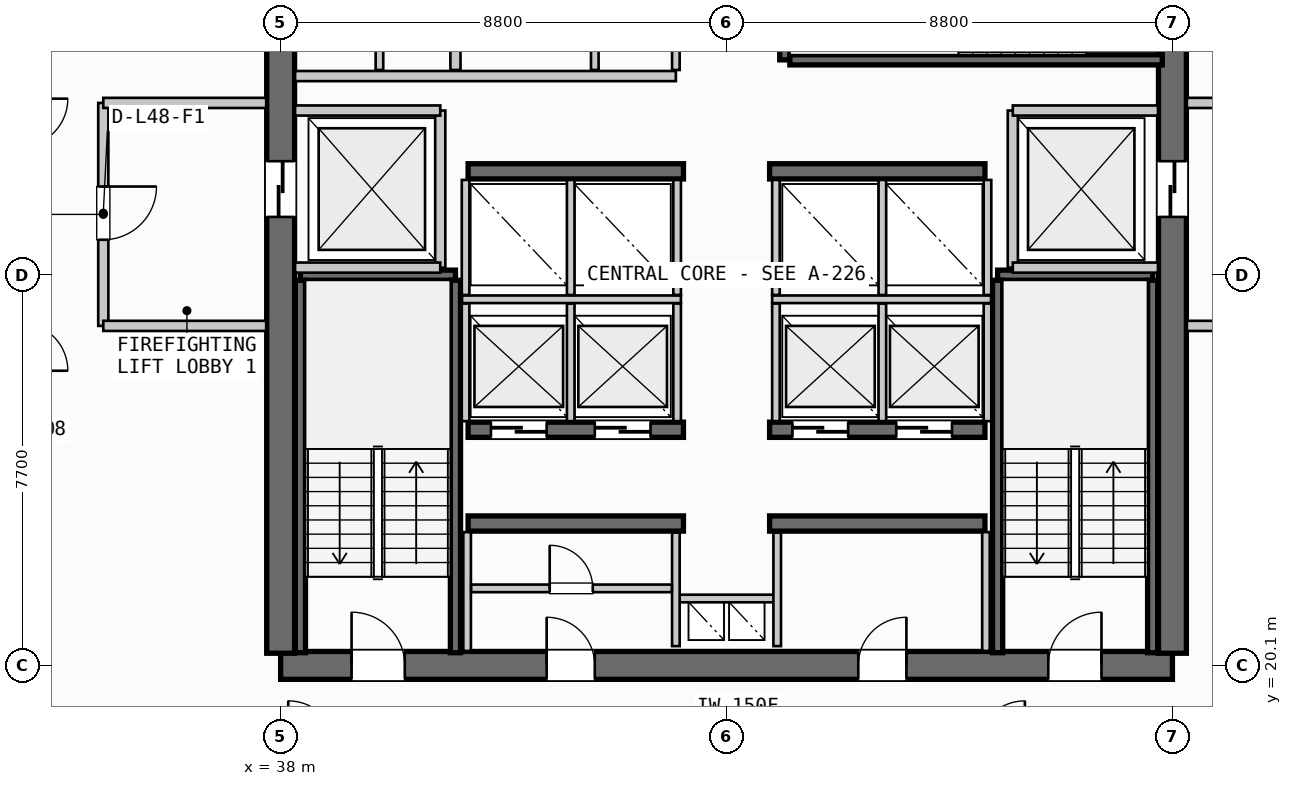
"""IFC4 building model, lengths in metres.
Left out: names, types, materials, properties, quantities, classifications, styles, units other than length and angle.
Written with IfcOpenShell. Run it as: python <this file> out.ifc"""

import sys

from ifc_helpers import new_model, si_unit, direction, frame, frame_2d, origin, place, context, subcontext, project, spatial, rectangle, extrude, source, transform, mapped, element, fill, save


model = new_model("IFC4")
c1 = context("Model", 3, precision=1e-05, world=origin(), true_north=direction((0.0, 1.0)))
c2 = subcontext(c1, "Body", "Model", "MODEL_VIEW")
j1 = project(units=[si_unit("LENGTHUNIT", "METRE"), si_unit("PLANEANGLEUNIT", "RADIAN")], contexts=[c1])
p1 = place(None, origin())
s1 = spatial("IfcSite", under=j1, at=p1, CompositionType="ELEMENT")
p2 = place(p1, origin())
s2 = spatial("IfcBuilding", under=s1, at=p2, CompositionType="ELEMENT")
p3 = place(p2, frame((0.0, 0.0, 186.9)))
s3 = spatial("IfcBuildingStorey", under=s2, at=p3, CompositionType="ELEMENT", Elevation=186.9)
p4 = place(p3, frame((38.0, 20.1, 0.0), z_axis=(0.0, 0.0, 1.0), x_axis=(1.0, 0.0, 0.0)))
e1 = element("IfcWall", 1, at=p4, inside=s3, PredefinedType="SHEAR", context=c2, shape_type="SweptSolid", body=[
    extrude(rectangle(XDim=17.6, YDim=0.55, at=frame_2d((8.8, 0.0))), origin(), (0.0, 0.0, 1.0), 3.26),
])
p5 = place(p4, frame((1.4, 0.0, 0.0)))
e2 = element("IfcOpeningElement", 2, at=p5, cuts=e1, PredefinedType="OPENING", context=c2, shape_type="SweptSolid", body=[
    extrude(rectangle(XDim=1.05, YDim=2.15, at=frame_2d((0.525, 1.075))), frame((0.0, 0.285, 0.0), z_axis=(0.0, -1.0, 0.0), x_axis=(1.0, 0.0, 0.0)), (0.0, 0.0, 1.0), 0.57),
])
p6 = place(p4, frame((15.15, 0.0, 0.0)))
e3 = element("IfcOpeningElement", 3, at=p6, cuts=e1, PredefinedType="OPENING", context=c2, shape_type="SweptSolid", body=[
    extrude(rectangle(XDim=1.05, YDim=2.15, at=frame_2d((0.525, 1.075))), frame((0.0, 0.285, 0.0), z_axis=(0.0, -1.0, 0.0), x_axis=(1.0, 0.0, 0.0)), (0.0, 0.0, 1.0), 0.57),
])
p7 = place(p4, frame((5.25, 0.0, 0.0)))
e4 = element("IfcOpeningElement", 4, at=p7, cuts=e1, PredefinedType="OPENING", context=c2, shape_type="SweptSolid", body=[
    extrude(rectangle(XDim=0.95, YDim=2.15, at=frame_2d((0.475, 1.075))), frame((0.0, 0.285, 0.0), z_axis=(0.0, -1.0, 0.0), x_axis=(1.0, 0.0, 0.0)), (0.0, 0.0, 1.0), 0.57),
])
p8 = place(p4, frame((11.4, 0.0, 0.0)))
e5 = element("IfcOpeningElement", 5, at=p8, cuts=e1, PredefinedType="OPENING", context=c2, shape_type="SweptSolid", body=[
    extrude(rectangle(XDim=0.95, YDim=2.15, at=frame_2d((0.475, 1.075))), frame((0.0, 0.285, 0.0), z_axis=(0.0, -1.0, 0.0), x_axis=(1.0, 0.0, 0.0)), (0.0, 0.0, 1.0), 0.57),
])
p9 = place(p3, frame((38.0, 35.26, 0.0), z_axis=(0.0, 0.0, 1.0), x_axis=(0.0, -1.0, 0.0)))
e6 = element("IfcWall", 6, at=p9, inside=s3, PredefinedType="SHEAR", context=c2, shape_type="SweptSolid", body=[
    extrude(rectangle(XDim=14.92, YDim=0.55, at=frame_2d((7.46, 0.0))), origin(), (0.0, 0.0, 1.0), 3.26),
])
p10 = place(p9, frame((5.21, 0.0, 0.0)))
e7 = element("IfcOpeningElement", 7, at=p10, cuts=e6, PredefinedType="OPENING", context=c2, shape_type="SweptSolid", body=[
    extrude(rectangle(XDim=1.1, YDim=2.2, at=frame_2d((0.55, 1.1))), frame((0.0, 0.285, 0.0), z_axis=(0.0, -1.0, 0.0), x_axis=(1.0, 0.0, 0.0)), (0.0, 0.0, 1.0), 0.57),
])
p11 = place(p3, frame((55.6, 20.34, 0.0), z_axis=(0.0, 0.0, 1.0), x_axis=(0.0, 1.0, 0.0)))
e8 = element("IfcWall", 8, at=p11, inside=s3, PredefinedType="SHEAR", context=c2, shape_type="SweptSolid", body=[
    extrude(rectangle(XDim=14.92, YDim=0.55, at=frame_2d((7.46, 0.0))), origin(), (0.0, 0.0, 1.0), 3.26),
])
p12 = place(p11, frame((12.71, 0.0, 0.0)))
e9 = element("IfcOpeningElement", 9, at=p12, cuts=e8, PredefinedType="OPENING", context=c2, shape_type="SweptSolid", body=[
    extrude(rectangle(XDim=1.05, YDim=2.15, at=frame_2d((0.525, 1.075))), frame((0.0, 0.285, 0.0), z_axis=(0.0, -1.0, 0.0), x_axis=(1.0, 0.0, 0.0)), (0.0, 0.0, 1.0), 0.57),
])
p13 = place(p11, frame((8.61, 0.0, 0.0)))
e10 = element("IfcOpeningElement", 10, at=p13, cuts=e8, PredefinedType="OPENING", context=c2, shape_type="SweptSolid", body=[
    extrude(rectangle(XDim=1.1, YDim=2.2, at=frame_2d((0.55, 1.1))), frame((0.0, 0.285, 0.0), z_axis=(0.0, -1.0, 0.0), x_axis=(1.0, 0.0, 0.0)), (0.0, 0.0, 1.0), 0.57),
])
for number, where, z_axis, x_axis in (
    (11, (41.7, 22.9, 0.0), (0.0, 0.0, 1.0), (1.0, 0.0, 0.0)),
    (12, (47.65, 22.9, 0.0), (0.0, 0.0, 1.0), (1.0, 0.0, 0.0)),
):
    element("IfcWall", number, at=place(p3, frame(where, z_axis=z_axis, x_axis=x_axis)), inside=s3, PredefinedType="SHEAR", context=c2, shape_type="SweptSolid", body=[
        extrude(rectangle(XDim=4.25, YDim=0.3, at=frame_2d((2.125, 0.0))), origin(), (0.0, 0.0, 1.0), 3.26),
    ])
p14 = place(p3, frame((41.7, 24.75, 0.0), z_axis=(0.0, 0.0, 1.0), x_axis=(1.0, 0.0, 0.0)))
e13 = element("IfcWall", 13, at=p14, inside=s3, PredefinedType="SHEAR", context=c2, shape_type="SweptSolid", body=[
    extrude(rectangle(XDim=4.25, YDim=0.3, at=frame_2d((2.125, 0.0))), origin(), (0.0, 0.0, 1.0), 3.26),
])
p15 = place(p14, frame((0.45, 0.0, 0.0)))
e14 = element("IfcOpeningElement", 14, at=p15, cuts=e13, PredefinedType="OPENING", context=c2, shape_type="SweptSolid", body=[
    extrude(rectangle(XDim=1.1, YDim=2.2, at=frame_2d((0.55, 1.1))), frame((0.0, 0.16, 0.0), z_axis=(0.0, -1.0, 0.0), x_axis=(1.0, 0.0, 0.0)), (0.0, 0.0, 1.0), 0.32),
])
p16 = place(p14, frame((2.5, 0.0, 0.0)))
e15 = element("IfcOpeningElement", 15, at=p16, cuts=e13, PredefinedType="OPENING", context=c2, shape_type="SweptSolid", body=[
    extrude(rectangle(XDim=1.1, YDim=2.2, at=frame_2d((0.55, 1.1))), frame((0.0, 0.16, 0.0), z_axis=(0.0, -1.0, 0.0), x_axis=(1.0, 0.0, 0.0)), (0.0, 0.0, 1.0), 0.32),
])
p17 = place(p3, frame((47.65, 24.75, 0.0), z_axis=(0.0, 0.0, 1.0), x_axis=(1.0, 0.0, 0.0)))
e16 = element("IfcWall", 16, at=p17, inside=s3, PredefinedType="SHEAR", context=c2, shape_type="SweptSolid", body=[
    extrude(rectangle(XDim=4.25, YDim=0.3, at=frame_2d((2.125, 0.0))), origin(), (0.0, 0.0, 1.0), 3.26),
])
p18 = place(p17, frame((0.45, 0.0, 0.0)))
e17 = element("IfcOpeningElement", 17, at=p18, cuts=e16, PredefinedType="OPENING", context=c2, shape_type="SweptSolid", body=[
    extrude(rectangle(XDim=1.1, YDim=2.2, at=frame_2d((0.55, 1.1))), frame((0.0, 0.16, 0.0), z_axis=(0.0, -1.0, 0.0), x_axis=(1.0, 0.0, 0.0)), (0.0, 0.0, 1.0), 0.32),
])
p19 = place(p17, frame((2.5, 0.0, 0.0)))
e18 = element("IfcOpeningElement", 18, at=p19, cuts=e16, PredefinedType="OPENING", context=c2, shape_type="SweptSolid", body=[
    extrude(rectangle(XDim=1.1, YDim=2.2, at=frame_2d((0.55, 1.1))), frame((0.0, 0.16, 0.0), z_axis=(0.0, -1.0, 0.0), x_axis=(1.0, 0.0, 0.0)), (0.0, 0.0, 1.0), 0.32),
])
for number, where, z_axis, x_axis in (
    (19, (41.7, 29.85, 0.0), (0.0, 0.0, 1.0), (1.0, 0.0, 0.0)),
    (20, (47.65, 29.85, 0.0), (0.0, 0.0, 1.0), (1.0, 0.0, 0.0)),
):
    element("IfcWall", number, at=place(p3, frame(where, z_axis=z_axis, x_axis=x_axis)), inside=s3, PredefinedType="SHEAR", context=c2, shape_type="SweptSolid", body=[
        extrude(rectangle(XDim=4.25, YDim=0.3, at=frame_2d((2.125, 0.0))), origin(), (0.0, 0.0, 1.0), 3.26),
    ])
p20 = place(p3, frame((38.39, 27.8, 0.0), z_axis=(0.0, 0.0, 1.0), x_axis=(1.0, 0.0, 0.0)))
e21 = element("IfcWall", 21, at=p20, inside=s3, PredefinedType="SHEAR", context=c2, shape_type="SweptSolid", body=[
    extrude(rectangle(XDim=3.06, YDim=0.2, at=frame_2d((1.53, 0.0))), origin(), (0.0, 0.0, 1.0), 3.26),
])
for number, where, z_axis, x_axis in (
    (22, (41.45, 27.7, 0.0), (0.0, 0.0, 1.0), (0.0, -1.0, 0.0)),
    (23, (38.39, 20.35, 0.0), (0.0, 0.0, 1.0), (0.0, 1.0, 0.0)),
):
    element("IfcWall", number, at=place(p3, frame(where, z_axis=z_axis, x_axis=x_axis)), inside=s3, PredefinedType="SHEAR", context=c2, shape_type="SweptSolid", body=[
        extrude(rectangle(XDim=7.35, YDim=0.2, at=frame_2d((3.675, 0.0))), origin(), (0.0, 0.0, 1.0), 3.26),
    ])
p21 = place(p3, frame((52.15, 27.8, 0.0), z_axis=(0.0, 0.0, 1.0), x_axis=(1.0, 0.0, 0.0)))
e24 = element("IfcWall", 24, at=p21, inside=s3, PredefinedType="SHEAR", context=c2, shape_type="SweptSolid", body=[
    extrude(rectangle(XDim=3.06, YDim=0.2, at=frame_2d((1.53, 0.0))), origin(), (0.0, 0.0, 1.0), 3.26),
])
for number, where, z_axis, x_axis in (
    (25, (55.21, 27.7, 0.0), (0.0, 0.0, 1.0), (0.0, -1.0, 0.0)),
    (26, (52.15, 20.35, 0.0), (0.0, 0.0, 1.0), (0.0, 1.0, 0.0)),
):
    element("IfcWall", number, at=place(p3, frame(where, z_axis=z_axis, x_axis=x_axis)), inside=s3, PredefinedType="SHEAR", context=c2, shape_type="SweptSolid", body=[
        extrude(rectangle(XDim=7.35, YDim=0.2, at=frame_2d((3.675, 0.0))), origin(), (0.0, 0.0, 1.0), 3.26),
    ])
p22 = place(p3, frame((47.95, 32.05, 0.0), z_axis=(0.0, 0.0, 1.0), x_axis=(0.0, 1.0, 0.0)))
e27 = element("IfcWall", 27, at=p22, inside=s3, PredefinedType="SHEAR", context=c2, shape_type="SweptSolid", body=[
    extrude(rectangle(XDim=3.06, YDim=0.2, at=frame_2d((1.53, 0.0))), origin(), (0.0, 0.0, 1.0), 3.26),
])
p23 = place(p3, frame((55.4, 32.05, 0.0), z_axis=(0.0, 0.0, 1.0), x_axis=(-1.0, 0.0, 0.0)))
e28 = element("IfcWall", 28, at=p23, inside=s3, PredefinedType="SHEAR", context=c2, shape_type="SweptSolid", body=[
    extrude(rectangle(XDim=7.35, YDim=0.2, at=frame_2d((3.675, 0.0))), origin(), (0.0, 0.0, 1.0), 3.26),
])
p24 = place(p3, frame((45.8, 21.42, 0.0), z_axis=(0.0, 0.0, 1.0), x_axis=(1.0, 0.0, 0.0)))
e29 = element("IfcWall", 29, at=p24, inside=s3, PredefinedType="PARTITIONING", context=c2, shape_type="SweptSolid", body=[
    extrude(rectangle(XDim=2.0, YDim=0.15, at=frame_2d((1.0, 0.0))), origin(), (0.0, 0.0, 1.0), 2.735),
])
for number, where, z_axis, x_axis in (
    (30, (45.8, 20.48, 0.0), (0.0, 0.0, 1.0), (0.0, 1.0, 0.0)),
    (31, (47.8, 20.48, 0.0), (0.0, 0.0, 1.0), (0.0, 1.0, 0.0)),
):
    element("IfcWall", number, at=place(p3, frame(where, z_axis=z_axis, x_axis=x_axis)), inside=s3, PredefinedType="PARTITIONING", context=c2, shape_type="SweptSolid", body=[
        extrude(rectangle(XDim=2.24, YDim=0.15, at=frame_2d((1.12, 0.0))), origin(), (0.0, 0.0, 1.0), 2.735),
    ])
p25 = place(p3, frame((41.15, 27.95, 0.0), z_axis=(0.0, 0.0, 1.0), x_axis=(0.0, 1.0, 0.0)))
e32 = element("IfcWall", 32, at=p25, inside=s3, PredefinedType="PARTITIONING", context=c2, shape_type="SweptSolid", body=[
    extrude(rectangle(XDim=3.1, YDim=0.2, at=frame_2d((1.55, 0.0))), origin(), (0.0, 0.0, 1.0), 2.735),
])
for number, where, z_axis, x_axis in (
    (33, (38.285, 27.95, 0.0), (0.0, 0.0, 1.0), (1.0, 0.0, 0.0)),
    (34, (38.285, 31.05, 0.0), (0.0, 0.0, 1.0), (1.0, 0.0, 0.0)),
):
    element("IfcWall", number, at=place(p3, frame(where, z_axis=z_axis, x_axis=x_axis)), inside=s3, PredefinedType="PARTITIONING", context=c2, shape_type="SweptSolid", body=[
        extrude(rectangle(XDim=2.865, YDim=0.2, at=frame_2d((1.433, 0.0))), origin(), (0.0, 0.0, 1.0), 2.735),
    ])
p26 = place(p3, frame((34.5, 31.2, 0.0), z_axis=(0.0, 0.0, 1.0), x_axis=(0.0, -1.0, 0.0)))
e35 = element("IfcWall", 35, at=p26, inside=s3, PredefinedType="PARTITIONING", context=c2, shape_type="SweptSolid", body=[
    extrude(rectangle(XDim=4.4, YDim=0.2, at=frame_2d((2.2, 0.0))), origin(), (0.0, 0.0, 1.0), 2.735),
])
p27 = place(p26, frame((1.65, 0.0, 0.0)))
e36 = element("IfcOpeningElement", 36, at=p27, cuts=e35, PredefinedType="OPENING", context=c2, shape_type="SweptSolid", body=[
    extrude(rectangle(XDim=1.05, YDim=2.15, at=frame_2d((0.525, 1.075))), frame((0.0, 0.11, 0.0), z_axis=(0.0, -1.0, 0.0), x_axis=(1.0, 0.0, 0.0)), (0.0, 0.0, 1.0), 0.22),
])
for number, where, z_axis, x_axis in (
    (37, (34.5, 26.8, 0.0), (0.0, 0.0, 1.0), (1.0, 0.0, 0.0)),
    (38, (34.5, 31.2, 0.0), (0.0, 0.0, 1.0), (1.0, 0.0, 0.0)),
):
    element("IfcWall", number, at=place(p3, frame(where, z_axis=z_axis, x_axis=x_axis)), inside=s3, PredefinedType="PARTITIONING", context=c2, shape_type="SweptSolid", body=[
        extrude(rectangle(XDim=3.215, YDim=0.2, at=frame_2d((1.607, 0.0))), origin(), (0.0, 0.0, 1.0), 2.735),
    ])
p28 = place(p3, frame((52.45, 27.95, 0.0), z_axis=(0.0, 0.0, 1.0), x_axis=(0.0, 1.0, 0.0)))
e39 = element("IfcWall", 39, at=p28, inside=s3, PredefinedType="PARTITIONING", context=c2, shape_type="SweptSolid", body=[
    extrude(rectangle(XDim=3.1, YDim=0.2, at=frame_2d((1.55, 0.0))), origin(), (0.0, 0.0, 1.0), 2.735),
])
for number, where, z_axis, x_axis in (
    (40, (52.45, 27.95, 0.0), (0.0, 0.0, 1.0), (1.0, 0.0, 0.0)),
    (41, (52.45, 31.05, 0.0), (0.0, 0.0, 1.0), (1.0, 0.0, 0.0)),
):
    element("IfcWall", number, at=place(p3, frame(where, z_axis=z_axis, x_axis=x_axis)), inside=s3, PredefinedType="PARTITIONING", context=c2, shape_type="SweptSolid", body=[
        extrude(rectangle(XDim=2.865, YDim=0.2, at=frame_2d((1.433, 0.0))), origin(), (0.0, 0.0, 1.0), 2.735),
    ])
for number, where, z_axis, x_axis in (
    (42, (55.885, 26.8, 0.0), (0.0, 0.0, 1.0), (1.0, 0.0, 0.0)),
    (43, (55.885, 31.2, 0.0), (0.0, 0.0, 1.0), (1.0, 0.0, 0.0)),
):
    element("IfcWall", number, at=place(p3, frame(where, z_axis=z_axis, x_axis=x_axis)), inside=s3, PredefinedType="PARTITIONING", context=c2, shape_type="SweptSolid", body=[
        extrude(rectangle(XDim=3.215, YDim=0.2, at=frame_2d((1.607, 0.0))), origin(), (0.0, 0.0, 1.0), 2.735),
    ])
for number, where, z_axis, x_axis in (
    (44, (41.68, 20.385, 0.0), (0.0, 0.0, 1.0), (0.0, 1.0, 0.0)),
    (45, (51.92, 20.385, 0.0), (0.0, 0.0, 1.0), (0.0, 1.0, 0.0)),
):
    element("IfcWall", number, at=place(p3, frame(where, z_axis=z_axis, x_axis=x_axis)), inside=s3, PredefinedType="PARTITIONING", context=c2, shape_type="SweptSolid", body=[
        extrude(rectangle(XDim=2.345, YDim=0.15, at=frame_2d((1.172, 0.0))), origin(), (0.0, 0.0, 1.0), 2.735),
    ])
p29 = place(p3, frame((41.76, 21.62, 0.0), z_axis=(0.0, 0.0, 1.0), x_axis=(1.0, 0.0, 0.0)))
e46 = element("IfcWall", 46, at=p29, inside=s3, PredefinedType="PARTITIONING", context=c2, shape_type="SweptSolid", body=[
    extrude(rectangle(XDim=3.96, YDim=0.15, at=frame_2d((1.98, 0.0))), origin(), (0.0, 0.0, 1.0), 2.735),
])
p30 = place(p29, frame((1.55, 0.0, 0.0)))
e47 = element("IfcOpeningElement", 47, at=p30, cuts=e46, PredefinedType="OPENING", context=c2, shape_type="SweptSolid", body=[
    extrude(rectangle(XDim=0.85, YDim=2.15, at=frame_2d((0.425, 1.075))), frame((0.0, 0.085, 0.0), z_axis=(0.0, -1.0, 0.0), x_axis=(1.0, 0.0, 0.0)), (0.0, 0.0, 1.0), 0.17),
])
p31 = place(p3, frame((41.58, 27.325, 0.0), z_axis=(0.0, 0.0, 1.0), x_axis=(1.0, 0.0, 0.0)))
e48 = element("IfcWall", 48, at=p31, inside=s3, PredefinedType="PARTITIONING", context=c2, shape_type="SweptSolid", body=[
    extrude(rectangle(XDim=4.32, YDim=0.15, at=frame_2d((2.16, 0.0))), origin(), (0.0, 0.0, 1.0), 2.735),
])
p32 = place(p3, frame((47.7, 27.325, 0.0), z_axis=(0.0, 0.0, 1.0), x_axis=(1.0, 0.0, 0.0)))
e49 = element("IfcWall", 49, at=p32, inside=s3, PredefinedType="PARTITIONING", context=c2, shape_type="SweptSolid", body=[
    extrude(rectangle(XDim=4.32, YDim=0.15, at=frame_2d((2.16, 0.0))), origin(), (0.0, 0.0, 1.0), 2.735),
])
for number, where, z_axis, x_axis in (
    (50, (41.65, 24.92, 0.0), (0.0, 0.0, 1.0), (0.0, 1.0, 0.0)),
    (51, (43.725, 24.92, 0.0), (0.0, 0.0, 1.0), (0.0, 1.0, 0.0)),
    (52, (45.825, 24.92, 0.0), (0.0, 0.0, 1.0), (0.0, 1.0, 0.0)),
    (53, (47.775, 24.92, 0.0), (0.0, 0.0, 1.0), (0.0, 1.0, 0.0)),
    (54, (49.875, 24.92, 0.0), (0.0, 0.0, 1.0), (0.0, 1.0, 0.0)),
    (55, (51.95, 24.92, 0.0), (0.0, 0.0, 1.0), (0.0, 1.0, 0.0)),
):
    element("IfcWall", number, at=place(p3, frame(where, z_axis=z_axis, x_axis=x_axis)), inside=s3, PredefinedType="PARTITIONING", context=c2, shape_type="SweptSolid", body=[
        extrude(rectangle(XDim=2.32, YDim=0.15, at=frame_2d((1.16, 0.0))), origin(), (0.0, 0.0, 1.0), 2.735),
    ])
for number, where, z_axis, x_axis in (
    (56, (41.65, 27.41, 0.0), (0.0, 0.0, 1.0), (0.0, 1.0, 0.0)),
    (57, (43.725, 27.41, 0.0), (0.0, 0.0, 1.0), (0.0, 1.0, 0.0)),
    (58, (45.825, 27.41, 0.0), (0.0, 0.0, 1.0), (0.0, 1.0, 0.0)),
    (59, (47.775, 27.41, 0.0), (0.0, 0.0, 1.0), (0.0, 1.0, 0.0)),
    (60, (49.875, 27.41, 0.0), (0.0, 0.0, 1.0), (0.0, 1.0, 0.0)),
    (61, (51.95, 27.41, 0.0), (0.0, 0.0, 1.0), (0.0, 1.0, 0.0)),
):
    element("IfcWall", number, at=place(p3, frame(where, z_axis=z_axis, x_axis=x_axis)), inside=s3, PredefinedType="PARTITIONING", context=c2, shape_type="SweptSolid", body=[
        extrude(rectangle(XDim=2.27, YDim=0.15, at=frame_2d((1.135, 0.0))), origin(), (0.0, 0.0, 1.0), 2.735),
    ])
p33 = place(p3, frame((41.45, 31.85, 0.0), z_axis=(0.0, 0.0, 1.0), x_axis=(0.0, 1.0, 0.0)))
e62 = element("IfcWall", 62, at=p33, inside=s3, PredefinedType="PARTITIONING", context=c2, shape_type="SweptSolid", body=[
    extrude(rectangle(XDim=3.365, YDim=0.2, at=frame_2d((1.683, 0.0))), origin(), (0.0, 0.0, 1.0), 2.735),
])
p34 = place(p3, frame((38.285, 31.73, 0.0), z_axis=(0.0, 0.0, 1.0), x_axis=(1.0, 0.0, 0.0)))
e63 = element("IfcWall", 63, at=p34, inside=s3, PredefinedType="PARTITIONING", context=c2, shape_type="SweptSolid", body=[
    extrude(rectangle(XDim=7.515, YDim=0.2, at=frame_2d((3.758, 0.0))), origin(), (0.0, 0.0, 1.0), 2.735),
])
for number, where, z_axis, x_axis in (
    (64, (45.8, 31.85, 0.0), (0.0, 0.0, 1.0), (0.0, 1.0, 0.0)),
    (65, (39.95, 31.85, 0.0), (0.0, 0.0, 1.0), (0.0, 1.0, 0.0)),
):
    element("IfcWall", number, at=place(p3, frame(where, z_axis=z_axis, x_axis=x_axis)), inside=s3, PredefinedType="PARTITIONING", context=c2, shape_type="SweptSolid", body=[
        extrude(rectangle(XDim=3.365, YDim=0.15, at=frame_2d((1.683, 0.0))), origin(), (0.0, 0.0, 1.0), 2.735),
    ])
p35 = place(p3, frame((44.2, 31.85, 0.0), z_axis=(0.0, 0.0, 1.0), x_axis=(0.0, 1.0, 0.0)))
e66 = element("IfcWall", 66, at=p35, inside=s3, PredefinedType="PLUMBINGWALL", context=c2, shape_type="SweptSolid", body=[
    extrude(rectangle(XDim=3.365, YDim=0.15, at=frame_2d((1.683, 0.0))), origin(), (0.0, 0.0, 1.0), 2.735),
])
m1 = source(origin(), c2, "Body", "SweptSolid", [
    extrude(rectangle(XDim=1.05, YDim=2.15, at=frame_2d((0.525, 1.075))), frame((0.0, 0.025, 0.0), z_axis=(0.0, -1.0, 0.0), x_axis=(1.0, 0.0, 0.0)), (0.0, 0.0, 1.0), 0.05),
])
p36 = place(p5, origin())
e67 = element("IfcDoor", 67, at=p36, inside=s3, OperationType="SINGLE_SWING_LEFT", PredefinedType="DOOR", context=c2, shape_type="MappedRepresentation", body=[
    mapped(m1, transform((0.0, 0.0, 0.0), scale=1.0)),
])
fill(e2, e67)
p37 = place(p6, origin())
e68 = element("IfcDoor", 68, at=p37, inside=s3, OperationType="SINGLE_SWING_RIGHT", PredefinedType="DOOR", context=c2, shape_type="MappedRepresentation", body=[
    mapped(m1, transform((0.0, 0.0, 0.0), scale=1.0)),
])
fill(e3, e68)
m2 = source(origin(), c2, "Body", "SweptSolid", [
    extrude(rectangle(XDim=1.1, YDim=2.2, at=frame_2d((0.55, 1.1))), frame((0.0, 0.025, 0.0), z_axis=(0.0, -1.0, 0.0), x_axis=(1.0, 0.0, 0.0)), (0.0, 0.0, 1.0), 0.05),
])
p38 = place(p10, origin())
e69 = element("IfcDoor", 69, at=p38, inside=s3, OperationType="SLIDING_TO_LEFT", PredefinedType="DOOR", context=c2, shape_type="MappedRepresentation", body=[
    mapped(m2, transform((0.0, 0.0, 0.0), scale=1.0)),
])
fill(e7, e69)
p39 = place(p13, origin())
e70 = element("IfcDoor", 70, at=p39, inside=s3, OperationType="SLIDING_TO_RIGHT", PredefinedType="DOOR", context=c2, shape_type="MappedRepresentation", body=[
    mapped(m2, transform((0.0, 0.0, 0.0), scale=1.0)),
])
fill(e10, e70)
m3 = source(origin(), c2, "Body", "SweptSolid", [
    extrude(rectangle(XDim=0.95, YDim=2.15, at=frame_2d((0.475, 1.075))), frame((0.0, 0.025, 0.0), z_axis=(0.0, -1.0, 0.0), x_axis=(1.0, 0.0, 0.0)), (0.0, 0.0, 1.0), 0.05),
])
p40 = place(p7, origin())
e71 = element("IfcDoor", 71, at=p40, inside=s3, OperationType="SINGLE_SWING_LEFT", PredefinedType="DOOR", context=c2, shape_type="MappedRepresentation", body=[
    mapped(m3, transform((0.0, 0.0, 0.0), scale=1.0)),
])
fill(e4, e71)
p41 = place(p8, origin())
e72 = element("IfcDoor", 72, at=p41, inside=s3, OperationType="SINGLE_SWING_RIGHT", PredefinedType="DOOR", context=c2, shape_type="MappedRepresentation", body=[
    mapped(m3, transform((0.0, 0.0, 0.0), scale=1.0)),
])
fill(e5, e72)
p42 = place(p15, origin())
e73 = element("IfcDoor", 73, at=p42, inside=s3, OperationType="SLIDING_TO_RIGHT", PredefinedType="DOOR", context=c2, shape_type="MappedRepresentation", body=[
    mapped(m2, transform((0.0, 0.0, 0.0), scale=1.0)),
])
fill(e14, e73)
p43 = place(p16, origin())
e74 = element("IfcDoor", 74, at=p43, inside=s3, OperationType="SLIDING_TO_RIGHT", PredefinedType="DOOR", context=c2, shape_type="MappedRepresentation", body=[
    mapped(m2, transform((0.0, 0.0, 0.0), scale=1.0)),
])
fill(e15, e74)
p44 = place(p18, origin())
e75 = element("IfcDoor", 75, at=p44, inside=s3, OperationType="SLIDING_TO_RIGHT", PredefinedType="DOOR", context=c2, shape_type="MappedRepresentation", body=[
    mapped(m2, transform((0.0, 0.0, 0.0), scale=1.0)),
])
fill(e17, e75)
p45 = place(p19, origin())
e76 = element("IfcDoor", 76, at=p45, inside=s3, OperationType="SLIDING_TO_RIGHT", PredefinedType="DOOR", context=c2, shape_type="MappedRepresentation", body=[
    mapped(m2, transform((0.0, 0.0, 0.0), scale=1.0)),
])
fill(e18, e76)
p46 = place(p27, origin())
e77 = element("IfcDoor", 77, at=p46, inside=s3, OperationType="SINGLE_SWING_LEFT", PredefinedType="DOOR", context=c2, shape_type="MappedRepresentation", body=[
    mapped(m1, transform((0.0, 0.0, 0.0), scale=1.0)),
])
fill(e36, e77)
m4 = source(origin(), c2, "Body", "SweptSolid", [
    extrude(rectangle(XDim=0.85, YDim=2.15, at=frame_2d((0.425, 1.075))), frame((0.0, 0.025, 0.0), z_axis=(0.0, -1.0, 0.0), x_axis=(1.0, 0.0, 0.0)), (0.0, 0.0, 1.0), 0.05),
])
p47 = place(p30, origin())
e78 = element("IfcDoor", 78, at=p47, inside=s3, OperationType="SINGLE_SWING_LEFT", PredefinedType="DOOR", context=c2, shape_type="MappedRepresentation", body=[
    mapped(m4, transform((0.0, 0.0, 0.0), scale=1.0)),
])
fill(e47, e78)
save(model, sys.argv[1])
